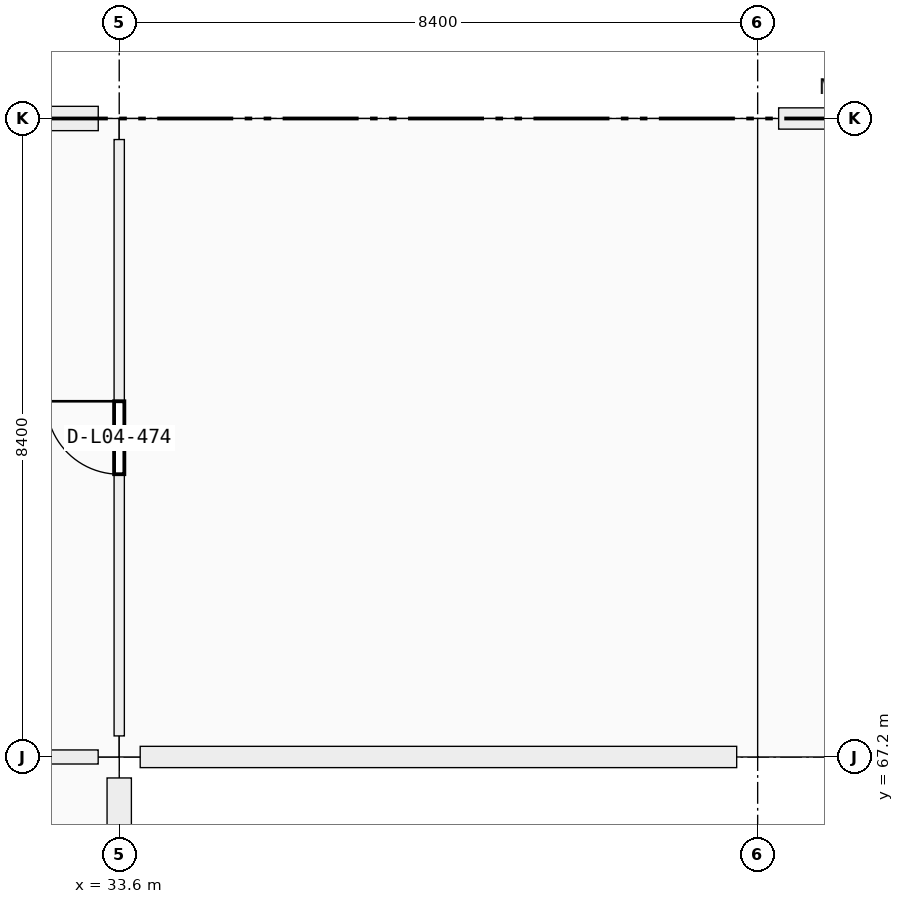
"""IFC4 building model, lengths in metres.
Left out: names, types, materials, properties, quantities, classifications, styles, units other than length and angle.
Written with IfcOpenShell. Run it as: python <this file> out.ifc"""

import sys

from ifc_helpers import new_model, si_unit, direction, frame, frame_2d, origin, origin_2d, place, context, subcontext, project, spatial, rectangle, extrude, element, fill, save


model = new_model("IFC4")
c1 = context("Model", 3, precision=1e-05, world=origin(), true_north=direction((0.0, 1.0)))
c2 = subcontext(c1, "Body", "Model", "MODEL_VIEW")
j1 = project(units=[si_unit("LENGTHUNIT", "METRE"), si_unit("PLANEANGLEUNIT", "RADIAN")], contexts=[c1])
p1 = place(None, origin())
s1 = spatial("IfcSite", under=j1, at=p1, CompositionType="ELEMENT")
p2 = place(p1, origin())
s2 = spatial("IfcBuilding", under=s1, at=p2, CompositionType="ELEMENT")
p3 = place(p2, frame((0.0, 0.0, 19.08)))
s3 = spatial("IfcBuildingStorey", under=s2, at=p3, CompositionType="ELEMENT", Elevation=19.08)
for number, where, z_axis, x_axis in (
    (1, (33.6, 67.2, 0.0), (0.0, 0.0, 1.0), (1.0, 0.0, 0.0)),
    (2, (33.6, 75.6, 0.0), (0.0, 0.0, 1.0), (1.0, 0.0, 0.0)),
):
    element("IfcColumn", number, at=place(p3, frame(where, z_axis=z_axis, x_axis=x_axis)), inside=s3, PredefinedType="COLUMN", context=c2, shape_type="SweptSolid", body=[
        extrude(rectangle(XDim=0.55, YDim=0.55, at=origin_2d()), origin(), (0.0, 0.0, 1.0), 4.16),
    ])
for number, where, z_axis, x_axis in (
    (3, (42.0, 67.2, 0.0), (0.0, 0.0, 1.0), (1.0, 0.0, 0.0)),
    (4, (42.0, 75.6, 0.0), (0.0, 0.0, 1.0), (1.0, 0.0, 0.0)),
):
    element("IfcColumn", number, at=place(p3, frame(where, z_axis=z_axis, x_axis=x_axis)), inside=s3, PredefinedType="COLUMN", context=c2, shape_type="SweptSolid", body=[
        extrude(rectangle(XDim=0.55, YDim=0.55, at=origin_2d()), origin(), (0.0, 0.0, 1.0), 4.07),
    ])
p4 = place(p3, frame((33.6, 66.924, 0.0), z_axis=(0.0, 0.0, 1.0), x_axis=(0.0, -1.0, 0.0)))
e5 = element("IfcWall", 5, at=p4, inside=s3, PredefinedType="SOLIDWALL", context=c2, shape_type="SweptSolid", body=[
    extrude(rectangle(XDim=7.848, YDim=0.32, at=frame_2d((3.924, 0.0))), origin(), (0.0, 0.0, 1.0), 3.37),
])
p5 = place(p4, frame((3.474, 0.0, 0.9)))
e6 = element("IfcOpeningElement", 6, at=p5, cuts=e5, PredefinedType="OPENING", context=c2, shape_type="SweptSolid", body=[
    extrude(rectangle(XDim=0.9, YDim=1.5, at=frame_2d((0.45, 0.75))), frame((0.0, 0.16, 0.0), z_axis=(0.0, -1.0, 0.0), x_axis=(1.0, 0.0, 0.0)), (0.0, 0.0, 1.0), 0.32),
])
p6 = place(p3, frame((25.476, 75.6, 0.0), z_axis=(0.0, 0.0, 1.0), x_axis=(1.0, 0.0, 0.0)))
e7 = element("IfcWall", 7, at=p6, inside=s3, PredefinedType="SOLIDWALL", context=c2, shape_type="SweptSolid", body=[
    extrude(rectangle(XDim=7.848, YDim=0.32, at=frame_2d((3.924, 0.0))), origin(), (0.0, 0.0, 1.0), 3.37),
])
p7 = place(p6, frame((3.074, 0.0, 0.9)))
e8 = element("IfcOpeningElement", 8, at=p7, cuts=e7, PredefinedType="OPENING", context=c2, shape_type="SweptSolid", body=[
    extrude(rectangle(XDim=1.7, YDim=1.85, at=frame_2d((0.85, 0.925))), frame((0.0, 0.16, 0.0), z_axis=(0.0, -1.0, 0.0), x_axis=(1.0, 0.0, 0.0)), (0.0, 0.0, 1.0), 0.32),
])
p8 = place(p3, frame((41.724, 67.2, 0.0), z_axis=(0.0, 0.0, 1.0), x_axis=(-1.0, 0.0, 0.0)))
e9 = element("IfcWall", 9, at=p8, inside=s3, PredefinedType="SOLIDWALL", context=c2, shape_type="SweptSolid", body=[
    extrude(rectangle(XDim=7.848, YDim=0.28, at=frame_2d((3.924, 0.0))), origin(), (0.0, 0.0, 1.0), 3.37),
])
p9 = place(p8, frame((2.774, 0.0, 0.9)))
e10 = element("IfcOpeningElement", 10, at=p9, cuts=e9, PredefinedType="OPENING", context=c2, shape_type="SweptSolid", body=[
    extrude(rectangle(XDim=2.3, YDim=1.85, at=frame_2d((1.15, 0.925))), frame((0.0, 0.14, 0.0), z_axis=(0.0, -1.0, 0.0), x_axis=(1.0, 0.0, 0.0)), (0.0, 0.0, 1.0), 0.28),
])
p10 = place(p3, frame((42.276, 75.6, 0.0), z_axis=(0.0, 0.0, 1.0), x_axis=(1.0, 0.0, 0.0)))
e11 = element("IfcWall", 11, at=p10, inside=s3, PredefinedType="SOLIDWALL", context=c2, shape_type="SweptSolid", body=[
    extrude(rectangle(XDim=7.848, YDim=0.28, at=frame_2d((3.924, 0.0))), origin(), (0.0, 0.0, 1.0), 3.37),
])
p11 = place(p10, frame((2.474, 0.0, 0.9)))
e12 = element("IfcOpeningElement", 12, at=p11, cuts=e11, PredefinedType="OPENING", context=c2, shape_type="SweptSolid", body=[
    extrude(rectangle(XDim=2.9, YDim=1.85, at=frame_2d((1.45, 0.925))), frame((0.0, 0.14, 0.0), z_axis=(0.0, -1.0, 0.0), x_axis=(1.0, 0.0, 0.0)), (0.0, 0.0, 1.0), 0.28),
])
p12 = place(p3, frame((25.477, 67.2, 0.0), z_axis=(0.0, 0.0, 1.0), x_axis=(1.0, 0.0, 0.0)))
e13 = element("IfcWall", 13, at=p12, inside=s3, PredefinedType="PARTITIONING", context=c2, shape_type="SweptSolid", body=[
    extrude(rectangle(XDim=7.846, YDim=0.185, at=frame_2d((3.923, 0.0))), origin(), (0.0, 0.0, 1.0), 3.19),
])
p13 = place(p12, frame((3.453, 0.0, 0.0)))
e14 = element("IfcOpeningElement", 14, at=p13, cuts=e13, PredefinedType="OPENING", context=c2, shape_type="SweptSolid", body=[
    extrude(rectangle(XDim=0.94, YDim=2.15, at=frame_2d((0.47, 1.075))), frame((0.0, 0.093, 0.0), z_axis=(0.0, -1.0, 0.0), x_axis=(1.0, 0.0, 0.0)), (0.0, 0.0, 1.0), 0.185),
])
p14 = place(p3, frame((33.6, 67.477, 0.0), z_axis=(0.0, 0.0, 1.0), x_axis=(0.0, 1.0, 0.0)))
e15 = element("IfcWall", 15, at=p14, inside=s3, PredefinedType="PARTITIONING", context=c2, shape_type="SweptSolid", body=[
    extrude(rectangle(XDim=7.846, YDim=0.135, at=frame_2d((3.923, 0.0))), origin(), (0.0, 0.0, 1.0), 3.19),
])
p15 = place(p14, frame((3.443, 0.0, 0.0)))
e16 = element("IfcOpeningElement", 16, at=p15, cuts=e15, PredefinedType="OPENING", context=c2, shape_type="SweptSolid", body=[
    extrude(rectangle(XDim=0.96, YDim=2.18, at=frame_2d((0.48, 1.09))), frame((0.0, 0.067, 0.0), z_axis=(0.0, -1.0, 0.0), x_axis=(1.0, 0.0, 0.0)), (0.0, 0.0, 1.0), 0.135),
])
p16 = place(p9, origin())
e17 = element("IfcWindow", 17, at=p16, inside=s3, PartitioningType="SINGLE_PANEL", PredefinedType="WINDOW", context=c2, shape_type="SweptSolid", body=[
    extrude(rectangle(XDim=2.3, YDim=1.85, at=frame_2d((1.15, 0.925))), frame((0.0, 0.03, 0.0), z_axis=(0.0, -1.0, 0.0), x_axis=(1.0, 0.0, 0.0)), (0.0, 0.0, 1.0), 0.06),
])
fill(e10, e17)
p17 = place(p15, origin())
e18 = element("IfcDoor", 18, at=p17, inside=s3, OperationType="SINGLE_SWING_RIGHT", PredefinedType="DOOR", context=c2, shape_type="SweptSolid", body=[
    extrude(rectangle(XDim=0.96, YDim=2.18, at=frame_2d((0.48, 1.09))), frame((0.0, 0.025, 0.0), z_axis=(0.0, -1.0, 0.0), x_axis=(1.0, 0.0, 0.0)), (0.0, 0.0, 1.0), 0.05),
])
fill(e16, e18)
save(model, sys.argv[1])
